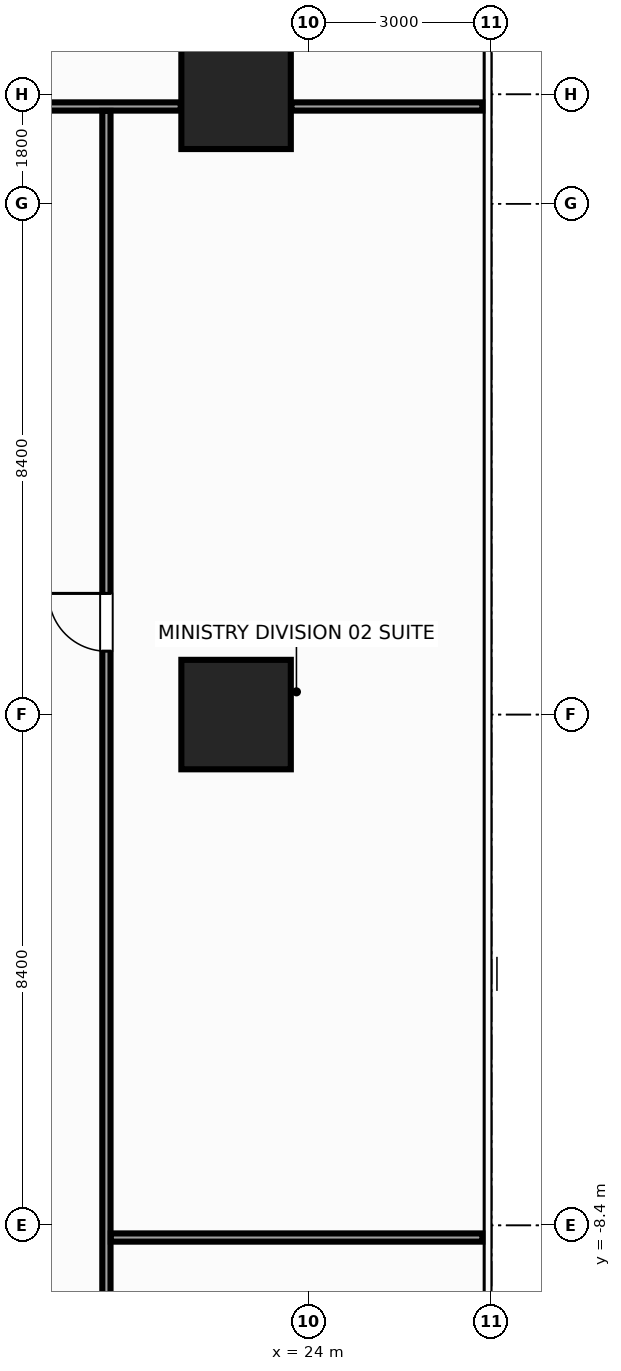
"""IFC4 building model, lengths in metres.
Left out: names, types, materials, properties, quantities, classifications, styles, units other than length and angle.
Written with IfcOpenShell. Run it as: python <this file> out.ifc"""

import sys

from ifc_helpers import new_model, si_unit, direction, frame, frame_2d, origin, origin_2d, place, context, subcontext, project, spatial, rectangle, extrude, source, transform, mapped, element, fill, save


model = new_model("IFC4")
c1 = context("Model", 3, precision=1e-05, world=origin(), true_north=direction((0.0, 1.0)))
c2 = subcontext(c1, "Body", "Model", "MODEL_VIEW")
j1 = project(units=[si_unit("LENGTHUNIT", "METRE"), si_unit("PLANEANGLEUNIT", "RADIAN")], contexts=[c1])
p1 = place(None, origin())
s1 = spatial("IfcSite", under=j1, at=p1, CompositionType="ELEMENT")
p2 = place(p1, origin())
s2 = spatial("IfcBuilding", under=s1, at=p2, CompositionType="ELEMENT")
p3 = place(p2, frame((0.0, 0.0, 41.6)))
s3 = spatial("IfcBuildingStorey", under=s2, at=p3, CompositionType="ELEMENT", Elevation=41.6)
m1 = source(origin(), c2, "Body", "SweptSolid", [
    extrude(rectangle(XDim=1.8, YDim=1.8, at=origin_2d()), origin(), (0.0, 0.0, 1.0), 3.6),
])
for number, where, z_axis, x_axis in (
    (1, (22.8, 0.0, 0.0), (0.0, 0.0, 1.0), (1.0, 0.0, 0.0)),
    (2, (22.8, 10.2, 0.0), (0.0, 0.0, 1.0), (1.0, 0.0, 0.0)),
):
    element("IfcColumn", number, at=place(p3, frame(where, z_axis=z_axis, x_axis=x_axis)), inside=s3, PredefinedType="COLUMN", context=c2, shape_type="MappedRepresentation", body=[
        mapped(m1, transform((0.0, 0.0, 0.0), x_axis=(1.0, 0.0, 0.0), y_axis=(0.0, 1.0, 0.0), z_axis=(0.0, 0.0, 1.0), scale=1.0)),
    ])
m2 = source(origin(), c2, "Body", "SweptSolid", [
    extrude(rectangle(XDim=4.18, YDim=0.135, at=frame_2d((2.09, 0.0))), origin(), (0.0, 0.0, 1.0), 2.745),
])
p4 = place(p3, frame((17.71, 10.0, 0.0), z_axis=(0.0, 0.0, 1.0), x_axis=(1.0, 0.0, 0.0)))
e3 = element("IfcWall", 3, at=p4, inside=s3, PredefinedType="PARTITIONING", context=c2, shape_type="MappedRepresentation", body=[
    mapped(m2, transform((0.0, 0.0, 0.0), x_axis=(1.0, 0.0, 0.0), y_axis=(0.0, 1.0, 0.0), z_axis=(0.0, 0.0, 1.0), scale=1.0)),
])
m3 = source(origin(), c2, "Body", "SweptSolid", [
    extrude(rectangle(XDim=3.14, YDim=0.135, at=frame_2d((1.57, 0.0))), origin(), (0.0, 0.0, 1.0), 2.435),
])
p5 = place(p3, frame((23.71, 10.0, 0.0), z_axis=(0.0, 0.0, 1.0), x_axis=(1.0, 0.0, 0.0)))
e4 = element("IfcWall", 4, at=p5, inside=s3, PredefinedType="PARTITIONING", context=c2, shape_type="MappedRepresentation", body=[
    mapped(m3, transform((0.0, 0.0, 0.0), x_axis=(1.0, 0.0, 0.0), y_axis=(0.0, 1.0, 0.0), z_axis=(0.0, 0.0, 1.0), scale=1.0)),
])
m4 = source(origin(), c2, "Body", "SweptSolid", [
    extrude(rectangle(XDim=24.123, YDim=0.135, at=frame_2d((12.061, 0.0))), origin(), (0.0, 0.0, 1.0), 2.745),
])
p6 = place(p3, frame((20.667, -14.195, 0.0), z_axis=(0.0, 0.0, 1.0), x_axis=(0.0, 1.0, 0.0)))
e5 = element("IfcWall", 5, at=p6, inside=s3, PredefinedType="PARTITIONING", context=c2, shape_type="MappedRepresentation", body=[
    mapped(m4, transform((0.0, 0.0, 0.0), x_axis=(1.0, 0.0, 0.0), y_axis=(0.0, 1.0, 0.0), z_axis=(0.0, 0.0, 1.0), scale=1.0)),
])
p7 = place(p6, frame((15.238, 0.0, 0.0)))
e6 = element("IfcOpeningElement", 6, at=p7, cuts=e5, PredefinedType="OPENING", context=c2, shape_type="SweptSolid", body=[
    extrude(rectangle(XDim=0.95, YDim=2.15, at=frame_2d((0.475, 1.075))), frame((0.0, 0.08, 0.0), z_axis=(0.0, -1.0, 0.0), x_axis=(1.0, 0.0, 0.0)), (0.0, 0.0, 1.0), 0.159),
])
p8 = place(p6, frame((1.249, 0.0, 0.0)))
e7 = element("IfcOpeningElement", 7, at=p8, cuts=e5, PredefinedType="OPENING", context=c2, shape_type="SweptSolid", body=[
    extrude(rectangle(XDim=0.95, YDim=2.15, at=frame_2d((0.475, 1.075))), frame((0.0, 0.08, 0.0), z_axis=(0.0, -1.0, 0.0), x_axis=(1.0, 0.0, 0.0)), (0.0, 0.0, 1.0), 0.159),
])
m5 = source(origin(), c2, "Body", "SweptSolid", [
    extrude(rectangle(XDim=6.11, YDim=0.135, at=frame_2d((3.055, 0.0))), origin(), (0.0, 0.0, 1.0), 2.745),
])
p9 = place(p3, frame((20.74, -8.6, 0.0), z_axis=(0.0, 0.0, 1.0), x_axis=(1.0, 0.0, 0.0)))
e8 = element("IfcWall", 8, at=p9, inside=s3, PredefinedType="PARTITIONING", context=c2, shape_type="MappedRepresentation", body=[
    mapped(m5, transform((0.0, 0.0, 0.0), x_axis=(1.0, 0.0, 0.0), y_axis=(0.0, 1.0, 0.0), z_axis=(0.0, 0.0, 1.0), scale=1.0)),
])
m6 = source(origin(), c2, "Body", "SweptSolid", [
    extrude(rectangle(XDim=0.95, YDim=2.15, at=frame_2d((0.475, 1.075))), frame((0.0, 0.025, 0.0), z_axis=(0.0, -1.0, 0.0), x_axis=(1.0, 0.0, 0.0)), (0.0, 0.0, 1.0), 0.05),
])
p10 = place(p7, origin())
e9 = element("IfcDoor", 9, at=p10, inside=s3, OperationType="SINGLE_SWING_RIGHT", PredefinedType="DOOR", context=c2, shape_type="MappedRepresentation", body=[
    mapped(m6, transform((0.0, 0.0, 0.0), x_axis=(1.0, 0.0, 0.0), y_axis=(0.0, 1.0, 0.0), z_axis=(0.0, 0.0, 1.0), scale=1.0)),
])
fill(e6, e9)
save(model, sys.argv[1])
